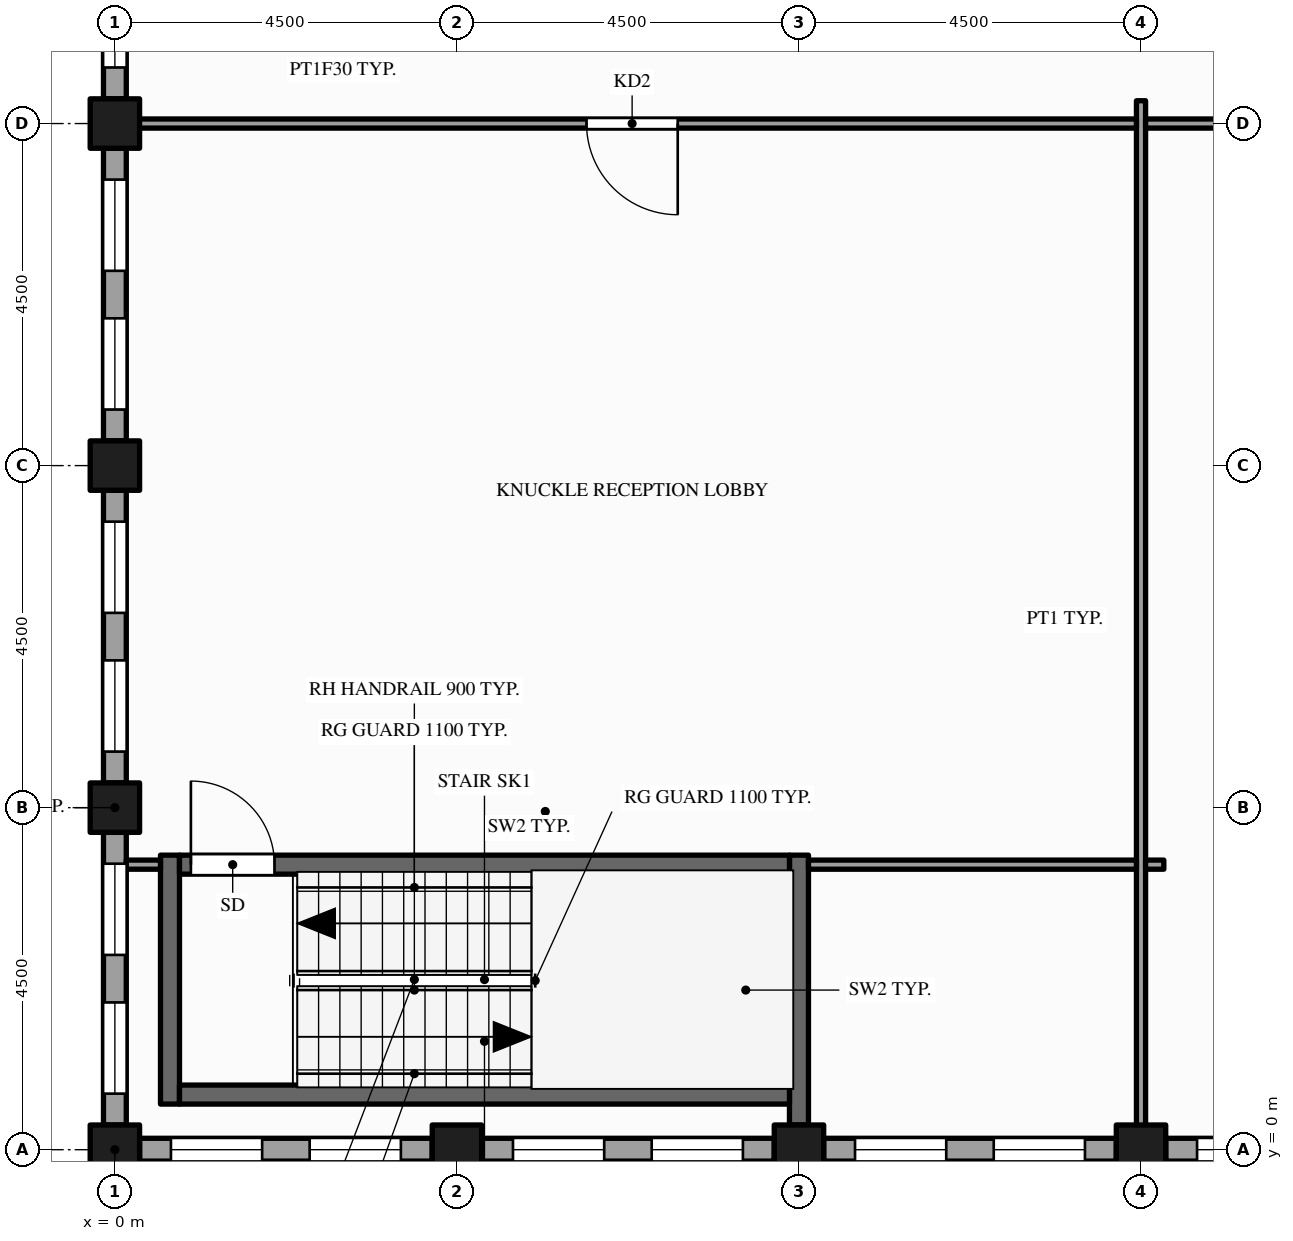
"""IFC4 building model, lengths in metres.
Left out: names, types, materials, properties, quantities, classifications, styles, units other than length and angle.
Written with IfcOpenShell. Run it as: python <this file> out.ifc"""

import sys

from ifc_helpers import new_model, si_unit, direction, frame, frame_2d, origin, origin_2d, place, context, subcontext, project, spatial, rectangle, hollow_rectangle, extrude, element, fill, save


model = new_model("IFC4")
c1 = context("Model", 3, precision=1e-05, world=origin(), true_north=direction((0.0, 1.0)))
c2 = subcontext(c1, "Body", "Model", "MODEL_VIEW")
j1 = project(units=[si_unit("LENGTHUNIT", "METRE"), si_unit("PLANEANGLEUNIT", "RADIAN")], contexts=[c1])
p1 = place(None, origin())
s1 = spatial("IfcSite", under=j1, at=p1, CompositionType="ELEMENT")
p2 = place(p1, origin())
s2 = spatial("IfcBuilding", under=s1, at=p2, CompositionType="ELEMENT")
p3 = place(p2, frame((0.0, 0.0, 281.0)))
s3 = spatial("IfcBuildingStorey", under=s2, at=p3, CompositionType="ELEMENT", Elevation=281.0)
for number, where, z_axis, x_axis in (
    (1, (0.0, 0.0, -0.15), (0.0, 0.0, 1.0), (1.0, 0.0, 0.0)),
    (2, (0.0, 4.5, -0.15), (0.0, 0.0, 1.0), (1.0, 0.0, 0.0)),
    (3, (0.0, 9.0, -0.15), (0.0, 0.0, 1.0), (1.0, 0.0, 0.0)),
    (4, (0.0, 13.5, -0.15), (0.0, 0.0, 1.0), (1.0, 0.0, 0.0)),
    (5, (4.5, 0.0, -0.15), (0.0, 0.0, 1.0), (1.0, 0.0, 0.0)),
    (6, (9.0, 0.0, -0.15), (0.0, 0.0, 1.0), (1.0, 0.0, 0.0)),
    (7, (13.5, 0.0, -0.15), (0.0, 0.0, 1.0), (1.0, 0.0, 0.0)),
):
    element("IfcColumn", number, at=place(p3, frame(where, z_axis=z_axis, x_axis=x_axis)), inside=s3, PredefinedType="COLUMN", context=c2, shape_type="SweptSolid", body=[
        extrude(hollow_rectangle(XDim=0.65, YDim=0.65, WallThickness=0.032, at=origin_2d()), origin(), (0.0, 0.0, 1.0), 4.0),
    ])
p4 = place(p3, frame((0.0, 17.675, 0.0), z_axis=(0.0, 0.0, 1.0), x_axis=(0.0, -1.0, 0.0)))
e8 = element("IfcWall", 8, at=p4, inside=s3, PredefinedType="STANDARD", context=c2, shape_type="SweptSolid", body=[
    extrude(rectangle(XDim=3.85, YDim=0.3, at=frame_2d((1.925, 0.0))), origin(), (0.0, 0.0, 1.0), 3.162),
])
p5 = place(p4, frame((0.413, 0.0, 0.9)))
e9 = element("IfcOpeningElement", 9, at=p5, cuts=e8, PredefinedType="OPENING", context=c2, shape_type="SweptSolid", body=[
    extrude(rectangle(XDim=1.2, YDim=2.0, at=frame_2d((0.6, 1.0))), frame((0.0, 0.16, 0.0), z_axis=(0.0, -1.0, 0.0), x_axis=(1.0, 0.0, 0.0)), (0.0, 0.0, 1.0), 0.32),
])
p6 = place(p4, frame((2.238, 0.0, 0.9)))
e10 = element("IfcOpeningElement", 10, at=p6, cuts=e8, PredefinedType="OPENING", context=c2, shape_type="SweptSolid", body=[
    extrude(rectangle(XDim=1.2, YDim=2.0, at=frame_2d((0.6, 1.0))), frame((0.0, 0.16, 0.0), z_axis=(0.0, -1.0, 0.0), x_axis=(1.0, 0.0, 0.0)), (0.0, 0.0, 1.0), 0.32),
])
p7 = place(p3, frame((0.0, 13.175, 0.0), z_axis=(0.0, 0.0, 1.0), x_axis=(0.0, -1.0, 0.0)))
e11 = element("IfcWall", 11, at=p7, inside=s3, PredefinedType="STANDARD", context=c2, shape_type="SweptSolid", body=[
    extrude(rectangle(XDim=3.85, YDim=0.3, at=frame_2d((1.925, 0.0))), origin(), (0.0, 0.0, 1.0), 3.162),
])
p8 = place(p7, frame((0.413, 0.0, 0.9)))
e12 = element("IfcOpeningElement", 12, at=p8, cuts=e11, PredefinedType="OPENING", context=c2, shape_type="SweptSolid", body=[
    extrude(rectangle(XDim=1.2, YDim=2.0, at=frame_2d((0.6, 1.0))), frame((0.0, 0.16, 0.0), z_axis=(0.0, -1.0, 0.0), x_axis=(1.0, 0.0, 0.0)), (0.0, 0.0, 1.0), 0.32),
])
p9 = place(p7, frame((2.238, 0.0, 0.9)))
e13 = element("IfcOpeningElement", 13, at=p9, cuts=e11, PredefinedType="OPENING", context=c2, shape_type="SweptSolid", body=[
    extrude(rectangle(XDim=1.2, YDim=2.0, at=frame_2d((0.6, 1.0))), frame((0.0, 0.16, 0.0), z_axis=(0.0, -1.0, 0.0), x_axis=(1.0, 0.0, 0.0)), (0.0, 0.0, 1.0), 0.32),
])
p10 = place(p3, frame((0.0, 8.675, 0.0), z_axis=(0.0, 0.0, 1.0), x_axis=(0.0, -1.0, 0.0)))
e14 = element("IfcWall", 14, at=p10, inside=s3, PredefinedType="STANDARD", context=c2, shape_type="SweptSolid", body=[
    extrude(rectangle(XDim=3.85, YDim=0.3, at=frame_2d((1.925, 0.0))), origin(), (0.0, 0.0, 1.0), 3.162),
])
p11 = place(p10, frame((0.413, 0.0, 0.9)))
e15 = element("IfcOpeningElement", 15, at=p11, cuts=e14, PredefinedType="OPENING", context=c2, shape_type="SweptSolid", body=[
    extrude(rectangle(XDim=1.2, YDim=2.0, at=frame_2d((0.6, 1.0))), frame((0.0, 0.16, 0.0), z_axis=(0.0, -1.0, 0.0), x_axis=(1.0, 0.0, 0.0)), (0.0, 0.0, 1.0), 0.32),
])
p12 = place(p10, frame((2.238, 0.0, 0.9)))
e16 = element("IfcOpeningElement", 16, at=p12, cuts=e14, PredefinedType="OPENING", context=c2, shape_type="SweptSolid", body=[
    extrude(rectangle(XDim=1.2, YDim=2.0, at=frame_2d((0.6, 1.0))), frame((0.0, 0.16, 0.0), z_axis=(0.0, -1.0, 0.0), x_axis=(1.0, 0.0, 0.0)), (0.0, 0.0, 1.0), 0.32),
])
p13 = place(p3, frame((0.0, 4.175, 0.0), z_axis=(0.0, 0.0, 1.0), x_axis=(0.0, -1.0, 0.0)))
e17 = element("IfcWall", 17, at=p13, inside=s3, PredefinedType="STANDARD", context=c2, shape_type="SweptSolid", body=[
    extrude(rectangle(XDim=3.85, YDim=0.3, at=frame_2d((1.925, 0.0))), origin(), (0.0, 0.0, 1.0), 3.162),
])
p14 = place(p13, frame((0.413, 0.0, 0.9)))
e18 = element("IfcOpeningElement", 18, at=p14, cuts=e17, PredefinedType="OPENING", context=c2, shape_type="SweptSolid", body=[
    extrude(rectangle(XDim=1.2, YDim=2.0, at=frame_2d((0.6, 1.0))), frame((0.0, 0.16, 0.0), z_axis=(0.0, -1.0, 0.0), x_axis=(1.0, 0.0, 0.0)), (0.0, 0.0, 1.0), 0.32),
])
p15 = place(p13, frame((2.238, 0.0, 0.9)))
e19 = element("IfcOpeningElement", 19, at=p15, cuts=e17, PredefinedType="OPENING", context=c2, shape_type="SweptSolid", body=[
    extrude(rectangle(XDim=1.2, YDim=2.0, at=frame_2d((0.6, 1.0))), frame((0.0, 0.16, 0.0), z_axis=(0.0, -1.0, 0.0), x_axis=(1.0, 0.0, 0.0)), (0.0, 0.0, 1.0), 0.32),
])
p16 = place(p3, frame((0.325, 0.0, 0.0), z_axis=(0.0, 0.0, 1.0), x_axis=(1.0, 0.0, 0.0)))
e20 = element("IfcWall", 20, at=p16, inside=s3, PredefinedType="STANDARD", context=c2, shape_type="SweptSolid", body=[
    extrude(rectangle(XDim=3.85, YDim=0.3, at=frame_2d((1.925, 0.0))), origin(), (0.0, 0.0, 1.0), 3.162),
])
p17 = place(p16, frame((0.413, 0.0, 0.9)))
e21 = element("IfcOpeningElement", 21, at=p17, cuts=e20, PredefinedType="OPENING", context=c2, shape_type="SweptSolid", body=[
    extrude(rectangle(XDim=1.2, YDim=2.0, at=frame_2d((0.6, 1.0))), frame((0.0, 0.16, 0.0), z_axis=(0.0, -1.0, 0.0), x_axis=(1.0, 0.0, 0.0)), (0.0, 0.0, 1.0), 0.32),
])
p18 = place(p16, frame((2.238, 0.0, 0.9)))
e22 = element("IfcOpeningElement", 22, at=p18, cuts=e20, PredefinedType="OPENING", context=c2, shape_type="SweptSolid", body=[
    extrude(rectangle(XDim=1.2, YDim=2.0, at=frame_2d((0.6, 1.0))), frame((0.0, 0.16, 0.0), z_axis=(0.0, -1.0, 0.0), x_axis=(1.0, 0.0, 0.0)), (0.0, 0.0, 1.0), 0.32),
])
p19 = place(p3, frame((4.825, 0.0, 0.0), z_axis=(0.0, 0.0, 1.0), x_axis=(1.0, 0.0, 0.0)))
e23 = element("IfcWall", 23, at=p19, inside=s3, PredefinedType="STANDARD", context=c2, shape_type="SweptSolid", body=[
    extrude(rectangle(XDim=3.85, YDim=0.3, at=frame_2d((1.925, 0.0))), origin(), (0.0, 0.0, 1.0), 3.162),
])
p20 = place(p19, frame((0.413, 0.0, 0.9)))
e24 = element("IfcOpeningElement", 24, at=p20, cuts=e23, PredefinedType="OPENING", context=c2, shape_type="SweptSolid", body=[
    extrude(rectangle(XDim=1.2, YDim=2.0, at=frame_2d((0.6, 1.0))), frame((0.0, 0.16, 0.0), z_axis=(0.0, -1.0, 0.0), x_axis=(1.0, 0.0, 0.0)), (0.0, 0.0, 1.0), 0.32),
])
p21 = place(p19, frame((2.238, 0.0, 0.9)))
e25 = element("IfcOpeningElement", 25, at=p21, cuts=e23, PredefinedType="OPENING", context=c2, shape_type="SweptSolid", body=[
    extrude(rectangle(XDim=1.2, YDim=2.0, at=frame_2d((0.6, 1.0))), frame((0.0, 0.16, 0.0), z_axis=(0.0, -1.0, 0.0), x_axis=(1.0, 0.0, 0.0)), (0.0, 0.0, 1.0), 0.32),
])
p22 = place(p3, frame((9.325, 0.0, 0.0), z_axis=(0.0, 0.0, 1.0), x_axis=(1.0, 0.0, 0.0)))
e26 = element("IfcWall", 26, at=p22, inside=s3, PredefinedType="STANDARD", context=c2, shape_type="SweptSolid", body=[
    extrude(rectangle(XDim=3.85, YDim=0.3, at=frame_2d((1.925, 0.0))), origin(), (0.0, 0.0, 1.0), 2.87),
])
p23 = place(p22, frame((0.413, 0.0, 0.9)))
e27 = element("IfcOpeningElement", 27, at=p23, cuts=e26, PredefinedType="OPENING", context=c2, shape_type="SweptSolid", body=[
    extrude(rectangle(XDim=1.2, YDim=1.75, at=frame_2d((0.6, 0.875))), frame((0.0, 0.16, 0.0), z_axis=(0.0, -1.0, 0.0), x_axis=(1.0, 0.0, 0.0)), (0.0, 0.0, 1.0), 0.32),
])
p24 = place(p22, frame((2.238, 0.0, 0.9)))
e28 = element("IfcOpeningElement", 28, at=p24, cuts=e26, PredefinedType="OPENING", context=c2, shape_type="SweptSolid", body=[
    extrude(rectangle(XDim=1.2, YDim=1.75, at=frame_2d((0.6, 0.875))), frame((0.0, 0.16, 0.0), z_axis=(0.0, -1.0, 0.0), x_axis=(1.0, 0.0, 0.0)), (0.0, 0.0, 1.0), 0.32),
])
p25 = place(p3, frame((13.825, 0.0, 0.0), z_axis=(0.0, 0.0, 1.0), x_axis=(1.0, 0.0, 0.0)))
e29 = element("IfcWall", 29, at=p25, inside=s3, PredefinedType="STANDARD", context=c2, shape_type="SweptSolid", body=[
    extrude(rectangle(XDim=3.85, YDim=0.3, at=frame_2d((1.925, 0.0))), origin(), (0.0, 0.0, 1.0), 2.87),
])
p26 = place(p25, frame((0.413, 0.0, 0.9)))
e30 = element("IfcOpeningElement", 30, at=p26, cuts=e29, PredefinedType="OPENING", context=c2, shape_type="SweptSolid", body=[
    extrude(rectangle(XDim=1.2, YDim=1.75, at=frame_2d((0.6, 0.875))), frame((0.0, 0.16, 0.0), z_axis=(0.0, -1.0, 0.0), x_axis=(1.0, 0.0, 0.0)), (0.0, 0.0, 1.0), 0.32),
])
p27 = place(p25, frame((2.238, 0.0, 0.9)))
e31 = element("IfcOpeningElement", 31, at=p27, cuts=e29, PredefinedType="OPENING", context=c2, shape_type="SweptSolid", body=[
    extrude(rectangle(XDim=1.2, YDim=1.75, at=frame_2d((0.6, 0.875))), frame((0.0, 0.16, 0.0), z_axis=(0.0, -1.0, 0.0), x_axis=(1.0, 0.0, 0.0)), (0.0, 0.0, 1.0), 0.32),
])
p28 = place(p3, frame((0.725, 0.6, 0.0), z_axis=(0.0, 0.0, 1.0), x_axis=(0.0, 1.0, 0.0)))
e32 = element("IfcWall", 32, at=p28, inside=s3, PredefinedType="SHEAR", context=c2, shape_type="SweptSolid", body=[
    extrude(rectangle(XDim=3.275, YDim=0.25, at=frame_2d((1.637, 0.0))), origin(), (0.0, 0.0, 1.0), 3.85),
])
p29 = place(p3, frame((9.0, 0.325, 0.0), z_axis=(0.0, 0.0, 1.0), x_axis=(0.0, 1.0, 0.0)))
e33 = element("IfcWall", 33, at=p29, inside=s3, PredefinedType="SHEAR", context=c2, shape_type="SweptSolid", body=[
    extrude(rectangle(XDim=3.55, YDim=0.25, at=frame_2d((1.775, 0.0))), origin(), (0.0, 0.0, 1.0), 3.85),
])
p30 = place(p3, frame((13.5, 0.15, 0.0), z_axis=(0.0, 0.0, 1.0), x_axis=(0.0, 1.0, 0.0)))
e34 = element("IfcWall", 34, at=p30, inside=s3, PredefinedType="PARTITIONING", context=c2, shape_type="SweptSolid", body=[
    extrude(rectangle(XDim=13.65, YDim=0.12, at=frame_2d((6.825, 0.0))), origin(), (0.0, 0.0, 1.0), 2.87),
])
p31 = place(p3, frame((0.85, 0.725, 0.0), z_axis=(0.0, 0.0, 1.0), x_axis=(1.0, 0.0, 0.0)))
e35 = element("IfcWall", 35, at=p31, inside=s3, PredefinedType="SHEAR", context=c2, shape_type="SweptSolid", body=[
    extrude(rectangle(XDim=8.025, YDim=0.25, at=frame_2d((4.012, 0.0))), origin(), (0.0, 0.0, 1.0), 3.85),
])
p32 = place(p3, frame((0.15, 3.75, 0.0), z_axis=(0.0, 0.0, 1.0), x_axis=(1.0, 0.0, 0.0)))
e36 = element("IfcWall", 36, at=p32, inside=s3, PredefinedType="PARTITIONING", context=c2, shape_type="SweptSolid", body=[
    extrude(rectangle(XDim=0.45, YDim=0.12, at=frame_2d((0.225, 0.0))), origin(), (0.0, 0.0, 1.0), 3.85),
])
p33 = place(p3, frame((0.85, 3.75, 0.0), z_axis=(0.0, 0.0, 1.0), x_axis=(1.0, 0.0, 0.0)))
e37 = element("IfcWall", 37, at=p33, inside=s3, PredefinedType="SHEAR", context=c2, shape_type="SweptSolid", body=[
    extrude(rectangle(XDim=8.025, YDim=0.25, at=frame_2d((4.012, 0.0))), origin(), (0.0, 0.0, 1.0), 3.85),
])
p34 = place(p33, frame((0.15, 0.0, 0.0)))
e38 = element("IfcOpeningElement", 38, at=p34, cuts=e37, PredefinedType="OPENING", context=c2, shape_type="SweptSolid", body=[
    extrude(rectangle(XDim=1.1, YDim=2.1, at=frame_2d((0.55, 1.05))), frame((0.0, 0.135, 0.0), z_axis=(0.0, -1.0, 0.0), x_axis=(1.0, 0.0, 0.0)), (0.0, 0.0, 1.0), 0.27),
])
p35 = place(p3, frame((9.125, 3.75, 0.0), z_axis=(0.0, 0.0, 1.0), x_axis=(1.0, 0.0, 0.0)))
e39 = element("IfcWall", 39, at=p35, inside=s3, PredefinedType="PARTITIONING", context=c2, shape_type="SweptSolid", body=[
    extrude(rectangle(XDim=4.315, YDim=0.12, at=frame_2d((2.157, 0.0))), origin(), (0.0, 0.0, 1.0), 2.87),
])
p36 = place(p3, frame((13.56, 3.75, 0.0), z_axis=(0.0, 0.0, 1.0), x_axis=(1.0, 0.0, 0.0)))
e40 = element("IfcWall", 40, at=p36, inside=s3, PredefinedType="PARTITIONING", context=c2, shape_type="SweptSolid", body=[
    extrude(rectangle(XDim=0.24, YDim=0.12, at=frame_2d((0.12, 0.0))), origin(), (0.0, 0.0, 1.0), 2.87),
])
p37 = place(p3, frame((0.15, 13.5, 0.0), z_axis=(0.0, 0.0, 1.0), x_axis=(1.0, 0.0, 0.0)))
e41 = element("IfcWall", 41, at=p37, inside=s3, PredefinedType="PARTITIONING", context=c2, shape_type="SweptSolid", body=[
    extrude(rectangle(XDim=13.29, YDim=0.12, at=frame_2d((6.645, 0.0))), origin(), (0.0, 0.0, 1.0), 2.87),
])
p38 = place(p37, frame((6.055, 0.0, 0.0)))
e42 = element("IfcOpeningElement", 42, at=p38, cuts=e41, PredefinedType="OPENING", context=c2, shape_type="SweptSolid", body=[
    extrude(rectangle(XDim=1.2, YDim=2.1, at=frame_2d((0.6, 1.05))), frame((0.0, 0.07, 0.0), z_axis=(0.0, -1.0, 0.0), x_axis=(1.0, 0.0, 0.0)), (0.0, 0.0, 1.0), 0.14),
])
p39 = place(p3, frame((13.56, 13.5, 0.0), z_axis=(0.0, 0.0, 1.0), x_axis=(1.0, 0.0, 0.0)))
e43 = element("IfcWall", 43, at=p39, inside=s3, PredefinedType="PARTITIONING", context=c2, shape_type="SweptSolid", body=[
    extrude(rectangle(XDim=6.63, YDim=0.12, at=frame_2d((3.315, 0.0))), origin(), (0.0, 0.0, 1.0), 2.87),
])
p40 = place(p39, frame((2.815, 0.0, 0.0)))
e44 = element("IfcOpeningElement", 44, at=p40, cuts=e43, PredefinedType="OPENING", context=c2, shape_type="SweptSolid", body=[
    extrude(rectangle(XDim=1.0, YDim=2.1, at=frame_2d((0.5, 1.05))), frame((0.0, 0.07, 0.0), z_axis=(0.0, -1.0, 0.0), x_axis=(1.0, 0.0, 0.0)), (0.0, 0.0, 1.0), 0.14),
])
p41 = place(p6, origin())
e45 = element("IfcWindow", 45, at=p41, inside=s3, PartitioningType="SINGLE_PANEL", PredefinedType="WINDOW", context=c2, shape_type="SweptSolid", body=[
    extrude(rectangle(XDim=1.2, YDim=2.0, at=frame_2d((0.6, 1.0))), frame((0.0, 0.03, 0.0), z_axis=(0.0, -1.0, 0.0), x_axis=(1.0, 0.0, 0.0)), (0.0, 0.0, 1.0), 0.06),
])
fill(e10, e45)
p42 = place(p8, origin())
e46 = element("IfcWindow", 46, at=p42, inside=s3, PartitioningType="SINGLE_PANEL", PredefinedType="WINDOW", context=c2, shape_type="SweptSolid", body=[
    extrude(rectangle(XDim=1.2, YDim=2.0, at=frame_2d((0.6, 1.0))), frame((0.0, 0.03, 0.0), z_axis=(0.0, -1.0, 0.0), x_axis=(1.0, 0.0, 0.0)), (0.0, 0.0, 1.0), 0.06),
])
fill(e12, e46)
p43 = place(p9, origin())
e47 = element("IfcWindow", 47, at=p43, inside=s3, PartitioningType="SINGLE_PANEL", PredefinedType="WINDOW", context=c2, shape_type="SweptSolid", body=[
    extrude(rectangle(XDim=1.2, YDim=2.0, at=frame_2d((0.6, 1.0))), frame((0.0, 0.03, 0.0), z_axis=(0.0, -1.0, 0.0), x_axis=(1.0, 0.0, 0.0)), (0.0, 0.0, 1.0), 0.06),
])
fill(e13, e47)
p44 = place(p11, origin())
e48 = element("IfcWindow", 48, at=p44, inside=s3, PartitioningType="SINGLE_PANEL", PredefinedType="WINDOW", context=c2, shape_type="SweptSolid", body=[
    extrude(rectangle(XDim=1.2, YDim=2.0, at=frame_2d((0.6, 1.0))), frame((0.0, 0.03, 0.0), z_axis=(0.0, -1.0, 0.0), x_axis=(1.0, 0.0, 0.0)), (0.0, 0.0, 1.0), 0.06),
])
fill(e15, e48)
p45 = place(p12, origin())
e49 = element("IfcWindow", 49, at=p45, inside=s3, PartitioningType="SINGLE_PANEL", PredefinedType="WINDOW", context=c2, shape_type="SweptSolid", body=[
    extrude(rectangle(XDim=1.2, YDim=2.0, at=frame_2d((0.6, 1.0))), frame((0.0, 0.03, 0.0), z_axis=(0.0, -1.0, 0.0), x_axis=(1.0, 0.0, 0.0)), (0.0, 0.0, 1.0), 0.06),
])
fill(e16, e49)
p46 = place(p14, origin())
e50 = element("IfcWindow", 50, at=p46, inside=s3, PartitioningType="SINGLE_PANEL", PredefinedType="WINDOW", context=c2, shape_type="SweptSolid", body=[
    extrude(rectangle(XDim=1.2, YDim=2.0, at=frame_2d((0.6, 1.0))), frame((0.0, 0.03, 0.0), z_axis=(0.0, -1.0, 0.0), x_axis=(1.0, 0.0, 0.0)), (0.0, 0.0, 1.0), 0.06),
])
fill(e18, e50)
p47 = place(p15, origin())
e51 = element("IfcWindow", 51, at=p47, inside=s3, PartitioningType="SINGLE_PANEL", PredefinedType="WINDOW", context=c2, shape_type="SweptSolid", body=[
    extrude(rectangle(XDim=1.2, YDim=2.0, at=frame_2d((0.6, 1.0))), frame((0.0, 0.03, 0.0), z_axis=(0.0, -1.0, 0.0), x_axis=(1.0, 0.0, 0.0)), (0.0, 0.0, 1.0), 0.06),
])
fill(e19, e51)
p48 = place(p17, origin())
e52 = element("IfcWindow", 52, at=p48, inside=s3, PartitioningType="SINGLE_PANEL", PredefinedType="WINDOW", context=c2, shape_type="SweptSolid", body=[
    extrude(rectangle(XDim=1.2, YDim=2.0, at=frame_2d((0.6, 1.0))), frame((0.0, 0.03, 0.0), z_axis=(0.0, -1.0, 0.0), x_axis=(1.0, 0.0, 0.0)), (0.0, 0.0, 1.0), 0.06),
])
fill(e21, e52)
p49 = place(p18, origin())
e53 = element("IfcWindow", 53, at=p49, inside=s3, PartitioningType="SINGLE_PANEL", PredefinedType="WINDOW", context=c2, shape_type="SweptSolid", body=[
    extrude(rectangle(XDim=1.2, YDim=2.0, at=frame_2d((0.6, 1.0))), frame((0.0, 0.03, 0.0), z_axis=(0.0, -1.0, 0.0), x_axis=(1.0, 0.0, 0.0)), (0.0, 0.0, 1.0), 0.06),
])
fill(e22, e53)
p50 = place(p20, origin())
e54 = element("IfcWindow", 54, at=p50, inside=s3, PartitioningType="SINGLE_PANEL", PredefinedType="WINDOW", context=c2, shape_type="SweptSolid", body=[
    extrude(rectangle(XDim=1.2, YDim=2.0, at=frame_2d((0.6, 1.0))), frame((0.0, 0.03, 0.0), z_axis=(0.0, -1.0, 0.0), x_axis=(1.0, 0.0, 0.0)), (0.0, 0.0, 1.0), 0.06),
])
fill(e24, e54)
p51 = place(p21, origin())
e55 = element("IfcWindow", 55, at=p51, inside=s3, PartitioningType="SINGLE_PANEL", PredefinedType="WINDOW", context=c2, shape_type="SweptSolid", body=[
    extrude(rectangle(XDim=1.2, YDim=2.0, at=frame_2d((0.6, 1.0))), frame((0.0, 0.03, 0.0), z_axis=(0.0, -1.0, 0.0), x_axis=(1.0, 0.0, 0.0)), (0.0, 0.0, 1.0), 0.06),
])
fill(e25, e55)
p52 = place(p23, origin())
e56 = element("IfcWindow", 56, at=p52, inside=s3, PartitioningType="SINGLE_PANEL", PredefinedType="WINDOW", context=c2, shape_type="SweptSolid", body=[
    extrude(rectangle(XDim=1.2, YDim=1.75, at=frame_2d((0.6, 0.875))), frame((0.0, 0.03, 0.0), z_axis=(0.0, -1.0, 0.0), x_axis=(1.0, 0.0, 0.0)), (0.0, 0.0, 1.0), 0.06),
])
fill(e27, e56)
p53 = place(p24, origin())
e57 = element("IfcWindow", 57, at=p53, inside=s3, PartitioningType="SINGLE_PANEL", PredefinedType="WINDOW", context=c2, shape_type="SweptSolid", body=[
    extrude(rectangle(XDim=1.2, YDim=1.75, at=frame_2d((0.6, 0.875))), frame((0.0, 0.03, 0.0), z_axis=(0.0, -1.0, 0.0), x_axis=(1.0, 0.0, 0.0)), (0.0, 0.0, 1.0), 0.06),
])
fill(e28, e57)
p54 = place(p26, origin())
e58 = element("IfcWindow", 58, at=p54, inside=s3, PartitioningType="SINGLE_PANEL", PredefinedType="WINDOW", context=c2, shape_type="SweptSolid", body=[
    extrude(rectangle(XDim=1.2, YDim=1.75, at=frame_2d((0.6, 0.875))), frame((0.0, 0.03, 0.0), z_axis=(0.0, -1.0, 0.0), x_axis=(1.0, 0.0, 0.0)), (0.0, 0.0, 1.0), 0.06),
])
fill(e30, e58)
p55 = place(p34, origin())
e59 = element("IfcDoor", 59, at=p55, inside=s3, OperationType="SINGLE_SWING_LEFT", PredefinedType="DOOR", context=c2, shape_type="SweptSolid", body=[
    extrude(rectangle(XDim=1.1, YDim=2.1, at=frame_2d((0.55, 1.05))), frame((0.0, 0.025, 0.0), z_axis=(0.0, -1.0, 0.0), x_axis=(1.0, 0.0, 0.0)), (0.0, 0.0, 1.0), 0.05),
])
fill(e38, e59)
p56 = place(p38, origin())
e60 = element("IfcDoor", 60, at=p56, inside=s3, OperationType="SINGLE_SWING_RIGHT", PredefinedType="DOOR", context=c2, shape_type="SweptSolid", body=[
    extrude(rectangle(XDim=1.2, YDim=2.1, at=frame_2d((0.6, 1.05))), frame((0.0, 0.025, 0.0), z_axis=(0.0, -1.0, 0.0), x_axis=(1.0, 0.0, 0.0)), (0.0, 0.0, 1.0), 0.05),
])
fill(e42, e60)
save(model, sys.argv[1])
